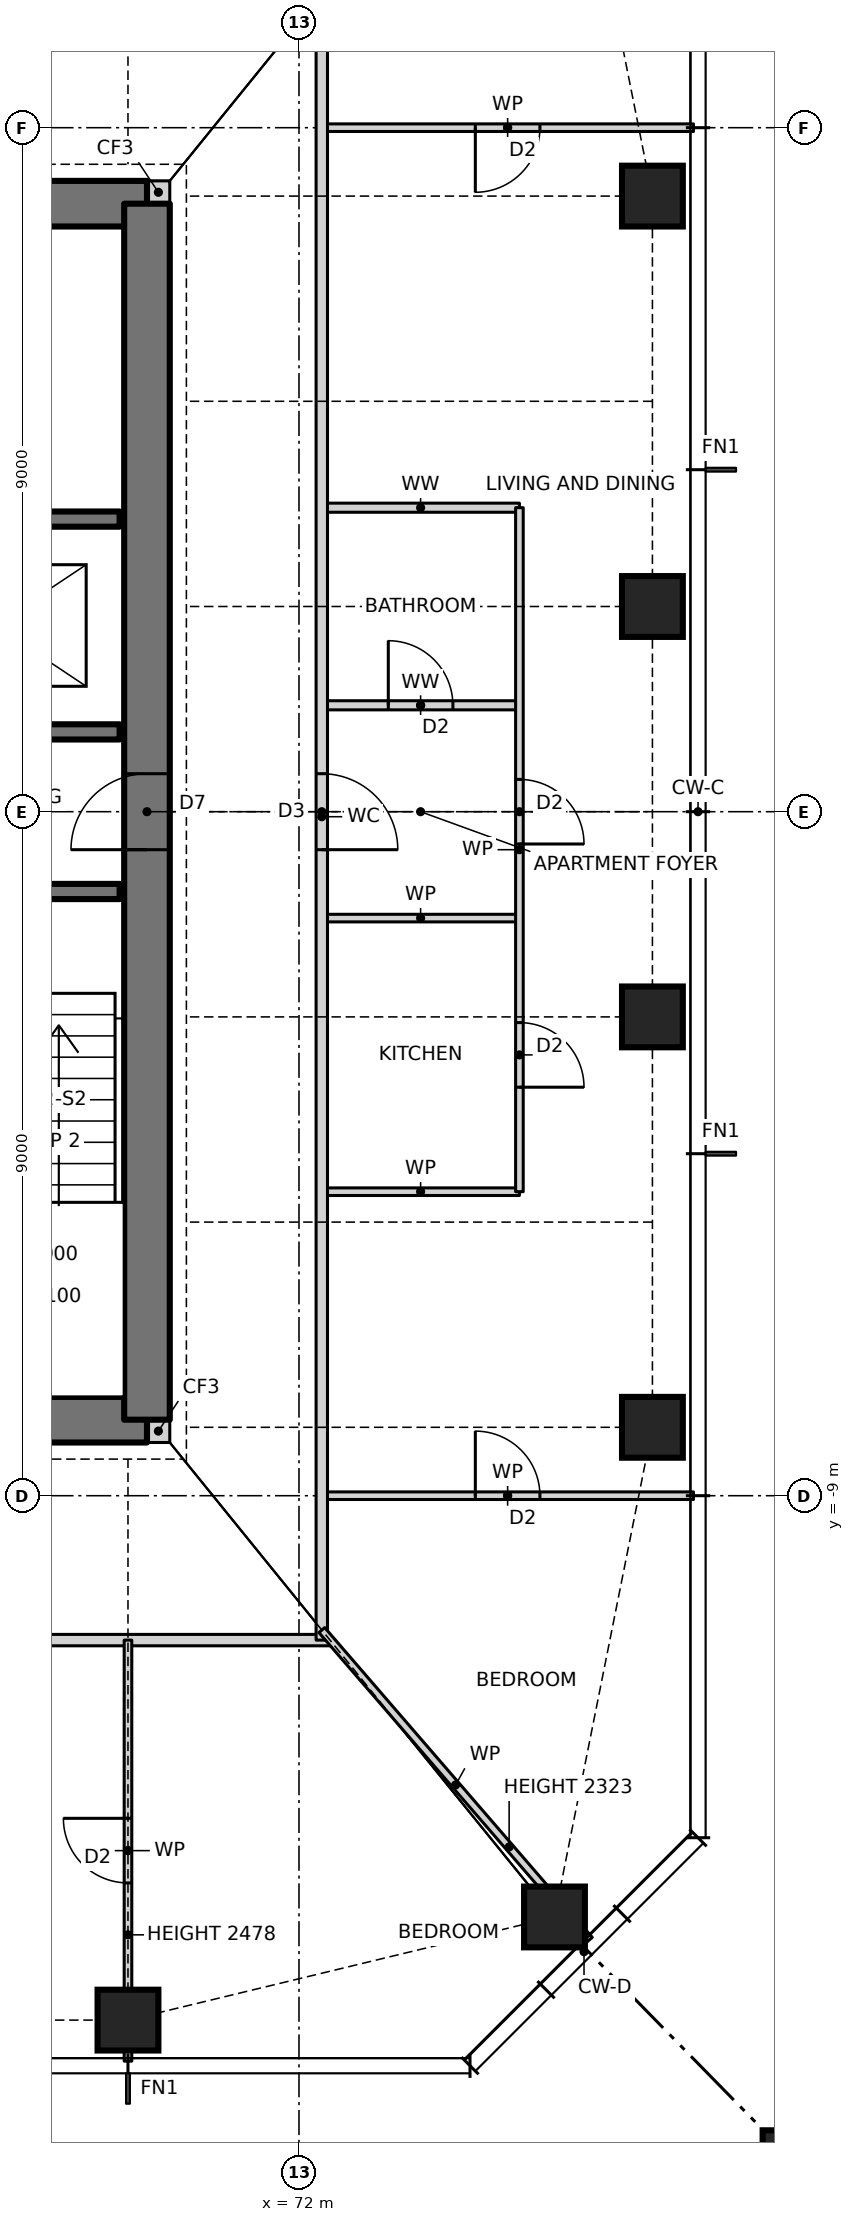
"""IFC4 building model, lengths in metres.
Left out: names, types, materials, properties, quantities, classifications, styles, units other than length and angle.
Written with IfcOpenShell. Run it as: python <this file> out.ifc"""

import sys

from ifc_helpers import new_model, si_unit, direction, frame, frame_2d, origin, origin_2d, place, context, subcontext, project, spatial, rectangle, hollow_rectangle, extrude, element, fill, save


model = new_model("IFC4")
c1 = context("Model", 3, precision=1e-05, world=origin(), true_north=direction((0.0, 1.0)))
c2 = subcontext(c1, "Body", "Model", "MODEL_VIEW")
j1 = project(units=[si_unit("LENGTHUNIT", "METRE"), si_unit("PLANEANGLEUNIT", "RADIAN")], contexts=[c1])
p1 = place(None, origin())
s1 = spatial("IfcSite", under=j1, at=p1, CompositionType="ELEMENT")
p2 = place(p1, origin())
s2 = spatial("IfcBuilding", under=s1, at=p2, CompositionType="ELEMENT")
p3 = place(p2, frame((0.0, 0.0, 126.0)))
s3 = spatial("IfcBuildingStorey", under=s2, at=p3, CompositionType="ELEMENT", Elevation=126.0)
for number, where, z_axis, x_axis in (
    (1, (69.75, -15.9, 0.0), (0.0, 0.0, 1.0), (1.0, 0.0, 0.0)),
    (2, (75.361, -14.543, 0.0), (0.0, 0.0, 1.0), (1.0, 0.0, 0.0)),
    (3, (76.65, -8.1, 0.0), (0.0, 0.0, 1.0), (1.0, 0.0, 0.0)),
    (4, (76.65, -2.7, 0.0), (0.0, 0.0, 1.0), (1.0, 0.0, 0.0)),
    (5, (76.65, 2.7, 0.0), (0.0, 0.0, 1.0), (1.0, 0.0, 0.0)),
    (6, (76.65, 8.1, 0.0), (0.0, 0.0, 1.0), (1.0, 0.0, 0.0)),
):
    element("IfcColumn", number, at=place(p3, frame(where, z_axis=z_axis, x_axis=x_axis)), inside=s3, PredefinedType="COLUMN", context=c2, shape_type="SweptSolid", body=[
        extrude(hollow_rectangle(XDim=0.8, YDim=0.8, WallThickness=0.1, at=origin_2d()), origin(), (0.0, 0.0, 1.0), 3.5),
    ])
p4 = place(p3, frame((78.65, -17.9, 0.0), z_axis=(0.0, 0.0, 1.0), x_axis=(1.0, 0.0, 0.0)))
e7 = element("IfcColumn", 7, at=p4, inside=s3, PredefinedType="COLUMN", context=c2, shape_type="SweptSolid", body=[
    extrude(hollow_rectangle(XDim=1.1, YDim=1.1, WallThickness=0.06, at=origin_2d()), origin(), (0.0, 0.0, 1.0), 3.5),
])
for number, where, z_axis, x_axis in (
    (8, (70.0, -8.15, 0.0), (0.0, 0.0, 1.0), (1.0, 0.0, 0.0)),
    (9, (70.0, 8.15, 0.0), (0.0, 0.0, 1.0), (1.0, 0.0, 0.0)),
):
    element("IfcWall", number, at=place(p3, frame(where, z_axis=z_axis, x_axis=x_axis)), inside=s3, PredefinedType="SOLIDWALL", context=c2, shape_type="SweptSolid", body=[
        extrude(rectangle(XDim=0.3, YDim=0.3, at=frame_2d((0.15, 0.0))), origin(), (0.0, 0.0, 1.0), 3.5),
    ])
p5 = place(p3, frame((56.0, -8.0, 0.0), z_axis=(0.0, 0.0, 1.0), x_axis=(1.0, 0.0, 0.0)))
e10 = element("IfcWall", 10, at=p5, inside=s3, PredefinedType="SHEAR", context=c2, shape_type="SweptSolid", body=[
    extrude(rectangle(XDim=14.0, YDim=0.6, at=frame_2d((7.0, 0.0))), origin(), (0.0, 0.0, 1.0), 3.5),
])
p6 = place(p5, frame((2.7, 0.0, 0.0)))
e11 = element("IfcOpeningElement", 11, at=p6, cuts=e10, PredefinedType="OPENING", context=c2, shape_type="SweptSolid", body=[
    extrude(rectangle(XDim=0.9, YDim=2.1, at=frame_2d((0.45, 1.05))), frame((0.0, 0.31, 0.0), z_axis=(0.0, -1.0, 0.0), x_axis=(1.0, 0.0, 0.0)), (0.0, 0.0, 1.0), 0.62),
])
p7 = place(p5, frame((7.7, 0.0, 0.0)))
e12 = element("IfcOpeningElement", 12, at=p7, cuts=e10, PredefinedType="OPENING", context=c2, shape_type="SweptSolid", body=[
    extrude(rectangle(XDim=0.9, YDim=2.1, at=frame_2d((0.45, 1.05))), frame((0.0, 0.31, 0.0), z_axis=(0.0, -1.0, 0.0), x_axis=(1.0, 0.0, 0.0)), (0.0, 0.0, 1.0), 0.62),
])
p8 = place(p3, frame((70.0, 8.0, 0.0), z_axis=(0.0, 0.0, 1.0), x_axis=(-1.0, 0.0, 0.0)))
e13 = element("IfcWall", 13, at=p8, inside=s3, PredefinedType="SHEAR", context=c2, shape_type="SweptSolid", body=[
    extrude(rectangle(XDim=14.0, YDim=0.6, at=frame_2d((7.0, 0.0))), origin(), (0.0, 0.0, 1.0), 3.5),
])
p9 = place(p8, frame((8.2, 0.0, 0.0)))
e14 = element("IfcOpeningElement", 14, at=p9, cuts=e13, PredefinedType="OPENING", context=c2, shape_type="SweptSolid", body=[
    extrude(rectangle(XDim=0.9, YDim=2.1, at=frame_2d((0.45, 1.05))), frame((0.0, 0.31, 0.0), z_axis=(0.0, -1.0, 0.0), x_axis=(1.0, 0.0, 0.0)), (0.0, 0.0, 1.0), 0.62),
])
p10 = place(p8, frame((3.2, 0.0, 0.0)))
e15 = element("IfcOpeningElement", 15, at=p10, cuts=e13, PredefinedType="OPENING", context=c2, shape_type="SweptSolid", body=[
    extrude(rectangle(XDim=0.9, YDim=2.1, at=frame_2d((0.45, 1.05))), frame((0.0, 0.31, 0.0), z_axis=(0.0, -1.0, 0.0), x_axis=(1.0, 0.0, 0.0)), (0.0, 0.0, 1.0), 0.62),
])
p11 = place(p3, frame((70.0, -8.0, 0.0), z_axis=(0.0, 0.0, 1.0), x_axis=(0.0, 1.0, 0.0)))
e16 = element("IfcWall", 16, at=p11, inside=s3, PredefinedType="SHEAR", context=c2, shape_type="SweptSolid", body=[
    extrude(rectangle(XDim=16.0, YDim=0.6, at=frame_2d((8.0, 0.0))), origin(), (0.0, 0.0, 1.0), 3.5),
])
p12 = place(p11, frame((7.5, 0.0, 0.0)))
e17 = element("IfcOpeningElement", 17, at=p12, cuts=e16, PredefinedType="OPENING", context=c2, shape_type="SweptSolid", body=[
    extrude(rectangle(XDim=1.0, YDim=2.1, at=frame_2d((0.5, 1.05))), frame((0.0, 0.31, 0.0), z_axis=(0.0, -1.0, 0.0), x_axis=(1.0, 0.0, 0.0)), (0.0, 0.0, 1.0), 0.62),
])
p13 = place(p3, frame((53.586, -10.9, 0.0), z_axis=(0.0, 0.0, 1.0), x_axis=(1.0, 0.0, 0.0)))
e18 = element("IfcWall", 18, at=p13, inside=s3, PredefinedType="PARTITIONING", context=c2, shape_type="SweptSolid", body=[
    extrude(rectangle(XDim=18.828, YDim=0.15, at=frame_2d((9.414, 0.0))), origin(), (0.0, 0.0, 1.0), 3.25),
])
p14 = place(p13, frame((8.914, 0.0, 0.0)))
e19 = element("IfcOpeningElement", 19, at=p14, cuts=e18, PredefinedType="OPENING", context=c2, shape_type="SweptSolid", body=[
    extrude(rectangle(XDim=1.0, YDim=2.1, at=frame_2d((0.5, 1.05))), frame((0.0, 0.085, 0.0), z_axis=(0.0, -1.0, 0.0), x_axis=(1.0, 0.0, 0.0)), (0.0, 0.0, 1.0), 0.17),
])
p15 = place(p3, frame((72.3, -9.0, 0.0), z_axis=(0.0, 0.0, 1.0), x_axis=(1.0, 0.0, 0.0)))
e20 = element("IfcWall", 20, at=p15, inside=s3, PredefinedType="PARTITIONING", context=c2, shape_type="SweptSolid", body=[
    extrude(rectangle(XDim=4.89, YDim=0.1, at=frame_2d((2.445, 0.0))), origin(), (0.0, 0.0, 1.0), 3.25),
])
p16 = place(p15, frame((2.02, 0.0, 0.0)))
e21 = element("IfcOpeningElement", 21, at=p16, cuts=e20, PredefinedType="OPENING", context=c2, shape_type="SweptSolid", body=[
    extrude(rectangle(XDim=0.85, YDim=2.1, at=frame_2d((0.425, 1.05))), frame((0.0, 0.06, 0.0), z_axis=(0.0, -1.0, 0.0), x_axis=(1.0, 0.0, 0.0)), (0.0, 0.0, 1.0), 0.12),
])
for number, where, z_axis, x_axis in (
    (22, (72.3, -5.0, 0.0), (0.0, 0.0, 1.0), (1.0, 0.0, 0.0)),
    (23, (72.3, -1.4, 0.0), (0.0, 0.0, 1.0), (1.0, 0.0, 0.0)),
):
    element("IfcWall", number, at=place(p3, frame(where, z_axis=z_axis, x_axis=x_axis)), inside=s3, PredefinedType="PARTITIONING", context=c2, shape_type="SweptSolid", body=[
        extrude(rectangle(XDim=2.6, YDim=0.1, at=frame_2d((1.3, 0.0))), origin(), (0.0, 0.0, 1.0), 3.25),
    ])
p17 = place(p3, frame((56.36, -1.05, 0.0), z_axis=(0.0, 0.0, 1.0), x_axis=(1.0, 0.0, 0.0)))
e24 = element("IfcWall", 24, at=p17, inside=s3, PredefinedType="SOLIDWALL", context=c2, shape_type="SweptSolid", body=[
    extrude(rectangle(XDim=13.28, YDim=0.2, at=frame_2d((6.64, 0.0))), origin(), (0.0, 0.0, 1.0), 3.5),
])
p18 = place(p17, frame((11.11, 0.0, 0.0)))
e25 = element("IfcOpeningElement", 25, at=p18, cuts=e24, PredefinedType="OPENING", context=c2, shape_type="SweptSolid", body=[
    extrude(rectangle(XDim=1.0, YDim=2.1, at=frame_2d((0.5, 1.05))), frame((0.0, 0.11, 0.0), z_axis=(0.0, -1.0, 0.0), x_axis=(1.0, 0.0, 0.0)), (0.0, 0.0, 1.0), 0.22),
])
p19 = place(p17, frame((1.087, 0.0, 0.0)))
e26 = element("IfcOpeningElement", 26, at=p19, cuts=e24, PredefinedType="OPENING", context=c2, shape_type="SweptSolid", body=[
    extrude(rectangle(XDim=1.1, YDim=2.1, at=frame_2d((0.55, 1.05))), frame((0.0, 0.11, 0.0), z_axis=(0.0, -1.0, 0.0), x_axis=(1.0, 0.0, 0.0)), (0.0, 0.0, 1.0), 0.22),
])
p20 = place(p17, frame((4.39, 0.0, 0.0)))
e27 = element("IfcOpeningElement", 27, at=p20, cuts=e24, PredefinedType="OPENING", context=c2, shape_type="SweptSolid", body=[
    extrude(rectangle(XDim=1.1, YDim=2.1, at=frame_2d((0.55, 1.05))), frame((0.0, 0.11, 0.0), z_axis=(0.0, -1.0, 0.0), x_axis=(1.0, 0.0, 0.0)), (0.0, 0.0, 1.0), 0.22),
])
p21 = place(p17, frame((7.724, 0.0, 0.0)))
e28 = element("IfcOpeningElement", 28, at=p21, cuts=e24, PredefinedType="OPENING", context=c2, shape_type="SweptSolid", body=[
    extrude(rectangle(XDim=1.1, YDim=2.1, at=frame_2d((0.55, 1.05))), frame((0.0, 0.11, 0.0), z_axis=(0.0, -1.0, 0.0), x_axis=(1.0, 0.0, 0.0)), (0.0, 0.0, 1.0), 0.22),
])
p22 = place(p3, frame((56.36, 1.05, 0.0), z_axis=(0.0, 0.0, 1.0), x_axis=(1.0, 0.0, 0.0)))
e29 = element("IfcWall", 29, at=p22, inside=s3, PredefinedType="SOLIDWALL", context=c2, shape_type="SweptSolid", body=[
    extrude(rectangle(XDim=13.28, YDim=0.2, at=frame_2d((6.64, 0.0))), origin(), (0.0, 0.0, 1.0), 3.5),
])
p23 = place(p22, frame((1.17, 0.0, 0.0)))
e30 = element("IfcOpeningElement", 30, at=p23, cuts=e29, PredefinedType="OPENING", context=c2, shape_type="SweptSolid", body=[
    extrude(rectangle(XDim=1.0, YDim=2.1, at=frame_2d((0.5, 1.05))), frame((0.0, 0.11, 0.0), z_axis=(0.0, -1.0, 0.0), x_axis=(1.0, 0.0, 0.0)), (0.0, 0.0, 1.0), 0.22),
])
p24 = place(p22, frame((7.54, 0.0, 0.0)))
e31 = element("IfcOpeningElement", 31, at=p24, cuts=e29, PredefinedType="OPENING", context=c2, shape_type="SweptSolid", body=[
    extrude(rectangle(XDim=0.9, YDim=2.1, at=frame_2d((0.45, 1.05))), frame((0.0, 0.11, 0.0), z_axis=(0.0, -1.0, 0.0), x_axis=(1.0, 0.0, 0.0)), (0.0, 0.0, 1.0), 0.22),
])
p25 = place(p22, frame((4.24, 0.0, 0.0)))
e32 = element("IfcOpeningElement", 32, at=p25, cuts=e29, PredefinedType="OPENING", context=c2, shape_type="SweptSolid", body=[
    extrude(rectangle(XDim=0.9, YDim=2.1, at=frame_2d((0.45, 1.05))), frame((0.0, 0.11, 0.0), z_axis=(0.0, -1.0, 0.0), x_axis=(1.0, 0.0, 0.0)), (0.0, 0.0, 1.0), 0.22),
])
p26 = place(p22, frame((10.96, 0.0, 0.0)))
e33 = element("IfcOpeningElement", 33, at=p26, cuts=e29, PredefinedType="OPENING", context=c2, shape_type="SweptSolid", body=[
    extrude(rectangle(XDim=1.3, YDim=2.1, at=frame_2d((0.65, 1.05))), frame((0.0, 0.11, 0.0), z_axis=(0.0, -1.0, 0.0), x_axis=(1.0, 0.0, 0.0)), (0.0, 0.0, 1.0), 0.22),
])
p27 = place(p3, frame((72.3, 1.4, 0.0), z_axis=(0.0, 0.0, 1.0), x_axis=(1.0, 0.0, 0.0)))
e34 = element("IfcWall", 34, at=p27, inside=s3, PredefinedType="PARTITIONING", context=c2, shape_type="SweptSolid", body=[
    extrude(rectangle(XDim=2.6, YDim=0.12, at=frame_2d((1.3, 0.0))), origin(), (0.0, 0.0, 1.0), 3.25),
])
p28 = place(p27, frame((0.875, 0.0, 0.0)))
e35 = element("IfcOpeningElement", 35, at=p28, cuts=e34, PredefinedType="OPENING", context=c2, shape_type="SweptSolid", body=[
    extrude(rectangle(XDim=0.85, YDim=2.1, at=frame_2d((0.425, 1.05))), frame((0.0, 0.07, 0.0), z_axis=(0.0, -1.0, 0.0), x_axis=(1.0, 0.0, 0.0)), (0.0, 0.0, 1.0), 0.14),
])
p29 = place(p3, frame((59.7, 3.85, 0.0), z_axis=(0.0, 0.0, 1.0), x_axis=(1.0, 0.0, 0.0)))
e36 = element("IfcWall", 36, at=p29, inside=s3, PredefinedType="SOLIDWALL", context=c2, shape_type="SweptSolid", body=[
    extrude(rectangle(XDim=9.94, YDim=0.2, at=frame_2d((4.97, 0.0))), origin(), (0.0, 0.0, 1.0), 3.5),
])
p30 = place(p3, frame((72.3, 4.0, 0.0), z_axis=(0.0, 0.0, 1.0), x_axis=(1.0, 0.0, 0.0)))
e37 = element("IfcWall", 37, at=p30, inside=s3, PredefinedType="PARTITIONING", context=c2, shape_type="SweptSolid", body=[
    extrude(rectangle(XDim=2.6, YDim=0.12, at=frame_2d((1.3, 0.0))), origin(), (0.0, 0.0, 1.0), 3.25),
])
p31 = place(p3, frame((72.3, 9.0, 0.0), z_axis=(0.0, 0.0, 1.0), x_axis=(1.0, 0.0, 0.0)))
e38 = element("IfcWall", 38, at=p31, inside=s3, PredefinedType="PARTITIONING", context=c2, shape_type="SweptSolid", body=[
    extrude(rectangle(XDim=4.89, YDim=0.1, at=frame_2d((2.445, 0.0))), origin(), (0.0, 0.0, 1.0), 3.25),
])
p32 = place(p31, frame((2.02, 0.0, 0.0)))
e39 = element("IfcOpeningElement", 39, at=p32, cuts=e38, PredefinedType="OPENING", context=c2, shape_type="SweptSolid", body=[
    extrude(rectangle(XDim=0.85, YDim=2.1, at=frame_2d((0.425, 1.05))), frame((0.0, 0.06, 0.0), z_axis=(0.0, -1.0, 0.0), x_axis=(1.0, 0.0, 0.0)), (0.0, 0.0, 1.0), 0.12),
])
p33 = place(p3, frame((74.9, -5.0, 0.0), z_axis=(0.0, 0.0, 1.0), x_axis=(0.0, 1.0, 0.0)))
e40 = element("IfcWall", 40, at=p33, inside=s3, PredefinedType="PARTITIONING", context=c2, shape_type="SweptSolid", body=[
    extrude(rectangle(XDim=9.0, YDim=0.1, at=frame_2d((4.5, 0.0))), origin(), (0.0, 0.0, 1.0), 3.25),
])
p34 = place(p33, frame((1.375, 0.0, 0.0)))
e41 = element("IfcOpeningElement", 41, at=p34, cuts=e40, PredefinedType="OPENING", context=c2, shape_type="SweptSolid", body=[
    extrude(rectangle(XDim=0.85, YDim=2.1, at=frame_2d((0.425, 1.05))), frame((0.0, 0.06, 0.0), z_axis=(0.0, -1.0, 0.0), x_axis=(1.0, 0.0, 0.0)), (0.0, 0.0, 1.0), 0.12),
])
p35 = place(p33, frame((4.575, 0.0, 0.0)))
e42 = element("IfcOpeningElement", 42, at=p35, cuts=e40, PredefinedType="OPENING", context=c2, shape_type="SweptSolid", body=[
    extrude(rectangle(XDim=0.85, YDim=2.1, at=frame_2d((0.425, 1.05))), frame((0.0, 0.06, 0.0), z_axis=(0.0, -1.0, 0.0), x_axis=(1.0, 0.0, 0.0)), (0.0, 0.0, 1.0), 0.12),
])
p36 = place(p3, frame((72.3, -10.9, 0.0), z_axis=(0.0, 0.0, 1.0), x_axis=(0.0, 1.0, 0.0)))
e43 = element("IfcWall", 43, at=p36, inside=s3, PredefinedType="PARTITIONING", context=c2, shape_type="SweptSolid", body=[
    extrude(rectangle(XDim=21.668, YDim=0.15, at=frame_2d((10.834, 0.0))), origin(), (0.0, 0.0, 1.0), 3.25),
])
p37 = place(p36, frame((10.4, 0.0, 0.0)))
e44 = element("IfcOpeningElement", 44, at=p37, cuts=e43, PredefinedType="OPENING", context=c2, shape_type="SweptSolid", body=[
    extrude(rectangle(XDim=1.0, YDim=2.1, at=frame_2d((0.5, 1.05))), frame((0.0, 0.085, 0.0), z_axis=(0.0, -1.0, 0.0), x_axis=(1.0, 0.0, 0.0)), (0.0, 0.0, 1.0), 0.17),
])
p38 = place(p3, frame((69.75, -16.44, 0.0), z_axis=(0.0, 0.0, 1.0), x_axis=(0.0, 1.0, 0.0)))
e45 = element("IfcWall", 45, at=p38, inside=s3, PredefinedType="PARTITIONING", context=c2, shape_type="SweptSolid", body=[
    extrude(rectangle(XDim=5.54, YDim=0.1, at=frame_2d((2.77, 0.0))), origin(), (0.0, 0.0, 1.0), 2.478),
])
p39 = place(p38, frame((2.345, 0.0, 0.0)))
e46 = element("IfcOpeningElement", 46, at=p39, cuts=e45, PredefinedType="OPENING", context=c2, shape_type="SweptSolid", body=[
    extrude(rectangle(XDim=0.85, YDim=2.1, at=frame_2d((0.425, 1.05))), frame((0.0, 0.06, 0.0), z_axis=(0.0, -1.0, 0.0), x_axis=(1.0, 0.0, 0.0)), (0.0, 0.0, 1.0), 0.12),
])
p40 = place(p3, frame((75.821, -14.844, 0.0), z_axis=(0.0, 0.0, 1.0), x_axis=(-0.653713095188, 0.756742485381, 0.0)))
e47 = element("IfcWall", 47, at=p40, inside=s3, PredefinedType="PARTITIONING", context=c2, shape_type="SweptSolid", body=[
    extrude(rectangle(XDim=5.386, YDim=0.1, at=frame_2d((2.693, 0.0))), origin(), (0.0, 0.0, 1.0), 2.323),
])
p41 = place(p39, origin())
e48 = element("IfcDoor", 48, at=p41, inside=s3, OperationType="SINGLE_SWING_RIGHT", PredefinedType="DOOR", context=c2, shape_type="SweptSolid", body=[
    extrude(rectangle(XDim=0.85, YDim=2.1, at=frame_2d((0.425, 1.05))), frame((0.0, 0.025, 0.0), z_axis=(0.0, -1.0, 0.0), x_axis=(1.0, 0.0, 0.0)), (0.0, 0.0, 1.0), 0.05),
])
fill(e46, e48)
p42 = place(p34, frame((0.85, 0.0, 0.0), z_axis=(0.0, 0.0, 1.0), x_axis=(-1.0, 0.0, 0.0)))
e49 = element("IfcDoor", 49, at=p42, inside=s3, OperationType="SINGLE_SWING_RIGHT", PredefinedType="DOOR", context=c2, shape_type="SweptSolid", body=[
    extrude(rectangle(XDim=0.85, YDim=2.1, at=frame_2d((0.425, 1.05))), frame((0.0, 0.025, 0.0), z_axis=(0.0, -1.0, 0.0), x_axis=(1.0, 0.0, 0.0)), (0.0, 0.0, 1.0), 0.05),
])
fill(e41, e49)
p43 = place(p37, frame((1.0, 0.0, 0.0), z_axis=(0.0, 0.0, 1.0), x_axis=(-1.0, 0.0, 0.0)))
e50 = element("IfcDoor", 50, at=p43, inside=s3, OperationType="SINGLE_SWING_RIGHT", PredefinedType="DOOR", context=c2, shape_type="SweptSolid", body=[
    extrude(rectangle(XDim=1.0, YDim=2.1, at=frame_2d((0.5, 1.05))), frame((0.0, 0.025, 0.0), z_axis=(0.0, -1.0, 0.0), x_axis=(1.0, 0.0, 0.0)), (0.0, 0.0, 1.0), 0.05),
])
fill(e44, e50)
p44 = place(p35, frame((0.85, 0.0, 0.0), z_axis=(0.0, 0.0, 1.0), x_axis=(-1.0, 0.0, 0.0)))
e51 = element("IfcDoor", 51, at=p44, inside=s3, OperationType="SINGLE_SWING_RIGHT", PredefinedType="DOOR", context=c2, shape_type="SweptSolid", body=[
    extrude(rectangle(XDim=0.85, YDim=2.1, at=frame_2d((0.425, 1.05))), frame((0.0, 0.025, 0.0), z_axis=(0.0, -1.0, 0.0), x_axis=(1.0, 0.0, 0.0)), (0.0, 0.0, 1.0), 0.05),
])
fill(e42, e51)
p45 = place(p28, origin())
e52 = element("IfcDoor", 52, at=p45, inside=s3, OperationType="SINGLE_SWING_LEFT", PredefinedType="DOOR", context=c2, shape_type="SweptSolid", body=[
    extrude(rectangle(XDim=0.85, YDim=2.1, at=frame_2d((0.425, 1.05))), frame((0.0, 0.025, 0.0), z_axis=(0.0, -1.0, 0.0), x_axis=(1.0, 0.0, 0.0)), (0.0, 0.0, 1.0), 0.05),
])
fill(e35, e52)
p46 = place(p16, origin())
e53 = element("IfcDoor", 53, at=p46, inside=s3, OperationType="SINGLE_SWING_LEFT", PredefinedType="DOOR", context=c2, shape_type="SweptSolid", body=[
    extrude(rectangle(XDim=0.85, YDim=2.1, at=frame_2d((0.425, 1.05))), frame((0.0, 0.025, 0.0), z_axis=(0.0, -1.0, 0.0), x_axis=(1.0, 0.0, 0.0)), (0.0, 0.0, 1.0), 0.05),
])
fill(e21, e53)
p47 = place(p32, frame((0.85, 0.0, 0.0), z_axis=(0.0, 0.0, 1.0), x_axis=(-1.0, 0.0, 0.0)))
e54 = element("IfcDoor", 54, at=p47, inside=s3, OperationType="SINGLE_SWING_RIGHT", PredefinedType="DOOR", context=c2, shape_type="SweptSolid", body=[
    extrude(rectangle(XDim=0.85, YDim=2.1, at=frame_2d((0.425, 1.05))), frame((0.0, 0.025, 0.0), z_axis=(0.0, -1.0, 0.0), x_axis=(1.0, 0.0, 0.0)), (0.0, 0.0, 1.0), 0.05),
])
fill(e39, e54)
p48 = place(p12, origin())
e55 = element("IfcDoor", 55, at=p48, inside=s3, OperationType="SINGLE_SWING_LEFT", PredefinedType="DOOR", context=c2, shape_type="SweptSolid", body=[
    extrude(rectangle(XDim=1.0, YDim=2.1, at=frame_2d((0.5, 1.05))), frame((0.0, 0.025, 0.0), z_axis=(0.0, -1.0, 0.0), x_axis=(1.0, 0.0, 0.0)), (0.0, 0.0, 1.0), 0.05),
])
fill(e17, e55)
save(model, sys.argv[1])
